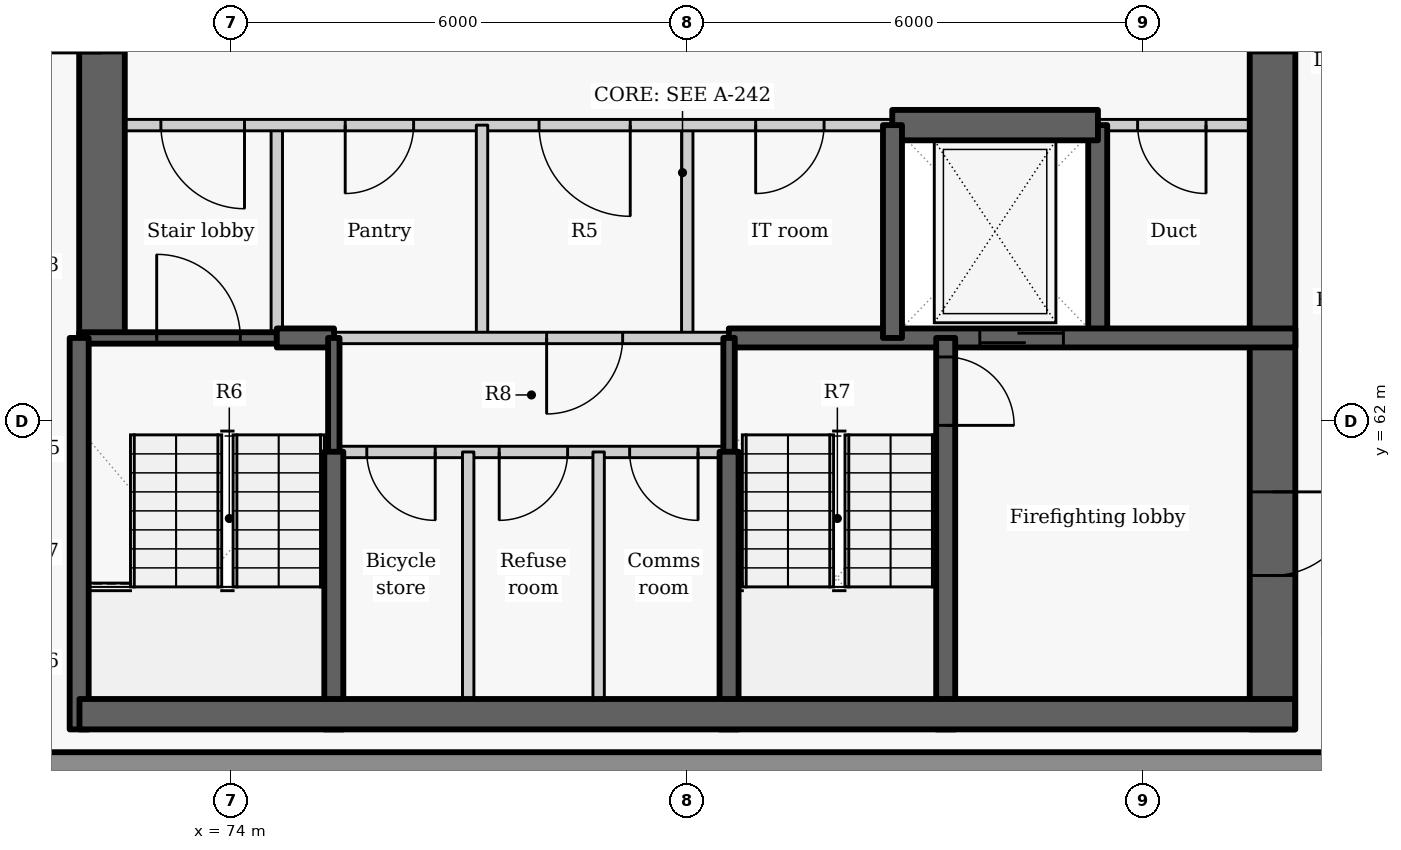
"""IFC4 building model, lengths in metres.
Left out: names, types, materials, properties, quantities, classifications, styles, units other than length and angle.
Written with IfcOpenShell. Run it as: python <this file> out.ifc"""

import sys

from ifc_helpers import new_model, si_unit, direction, frame, frame_2d, origin, place, context, subcontext, project, spatial, rectangle, extrude, element, fill, save


model = new_model("IFC4")
c1 = context("Model", 3, precision=1e-05, world=origin(), true_north=direction((0.0, 1.0)))
c2 = subcontext(c1, "Body", "Model", "MODEL_VIEW")
j1 = project(units=[si_unit("LENGTHUNIT", "METRE"), si_unit("PLANEANGLEUNIT", "RADIAN")], contexts=[c1])
p1 = place(None, origin())
s1 = spatial("IfcSite", under=j1, at=p1, CompositionType="ELEMENT")
p2 = place(p1, origin())
s2 = spatial("IfcBuilding", under=s1, at=p2, CompositionType="ELEMENT")
p3 = place(p2, frame((0.0, 0.0, 249.3)))
s3 = spatial("IfcBuildingStorey", under=s2, at=p3, CompositionType="ELEMENT", Elevation=249.3)
p4 = place(p3, frame((70.501, 57.5, 0.0), z_axis=(0.0, 0.0, 1.0), x_axis=(1.0, 0.0, 0.0)))
e1 = element("IfcWall", 1, at=p4, inside=s3, PredefinedType="SOLIDWALL", context=c2, shape_type="SweptSolid", body=[
    extrude(rectangle(XDim=18.993, YDim=0.3, at=frame_2d((9.496, 0.0))), origin(), (0.0, 0.0, 1.0), 2.425),
])
p5 = place(p3, frame((74.6, 63.1, 0.0), z_axis=(0.0, 0.0, 1.0), x_axis=(0.0, 1.0, 0.0)))
e2 = element("IfcWall", 2, at=p5, inside=s3, PredefinedType="PARTITIONING", context=c2, shape_type="SweptSolid", body=[
    extrude(rectangle(XDim=2.8, YDim=0.15, at=frame_2d((1.4, 0.0))), origin(), (0.0, 0.0, 1.0), 3.025),
])
p6 = place(p3, frame((72.3, 63.1, -0.275), z_axis=(0.0, 0.0, 1.0), x_axis=(0.0, 1.0, 0.0)))
e3 = element("IfcWall", 3, at=p6, inside=s3, PredefinedType="SHEAR", context=c2, shape_type="SweptSolid", body=[
    extrude(rectangle(XDim=9.1, YDim=0.6, at=frame_2d((4.55, 0.0))), origin(), (0.0, 0.0, 1.0), 3.3),
])
p7 = place(p6, frame((3.75, 0.0, 0.275)))
e4 = element("IfcOpeningElement", 4, at=p7, cuts=e3, PredefinedType="OPENING", context=c2, shape_type="SweptSolid", body=[
    extrude(rectangle(XDim=1.5, YDim=2.1, at=frame_2d((0.75, 1.05))), frame((0.0, 0.31, 0.0), z_axis=(0.0, -1.0, 0.0), x_axis=(1.0, 0.0, 0.0)), (0.0, 0.0, 1.0), 0.62),
])
p8 = place(p3, frame((85.4, 63.1, -0.275), z_axis=(0.0, 0.0, 1.0), x_axis=(0.0, 1.0, 0.0)))
e5 = element("IfcWall", 5, at=p8, inside=s3, PredefinedType="SHEAR", context=c2, shape_type="SweptSolid", body=[
    extrude(rectangle(XDim=2.8, YDim=0.25, at=frame_2d((1.4, 0.0))), origin(), (0.0, 0.0, 1.0), 3.3),
])
p9 = place(p3, frame((87.7, 72.2, -0.275), z_axis=(0.0, 0.0, 1.0), x_axis=(0.0, -1.0, 0.0)))
e6 = element("IfcWall", 6, at=p9, inside=s3, PredefinedType="SHEAR", context=c2, shape_type="SweptSolid", body=[
    extrude(rectangle(XDim=14.25, YDim=0.6, at=frame_2d((7.125, 0.0))), origin(), (0.0, 0.0, 1.0), 3.3),
])
p10 = place(p9, frame((3.85, 0.0, 0.275)))
e7 = element("IfcOpeningElement", 7, at=p10, cuts=e6, PredefinedType="OPENING", context=c2, shape_type="SweptSolid", body=[
    extrude(rectangle(XDim=1.5, YDim=2.1, at=frame_2d((0.75, 1.05))), frame((0.0, 0.31, 0.0), z_axis=(0.0, -1.0, 0.0), x_axis=(1.0, 0.0, 0.0)), (0.0, 0.0, 1.0), 0.62),
])
p11 = place(p9, frame((11.125, 0.0, 0.275)))
e8 = element("IfcOpeningElement", 8, at=p11, cuts=e6, PredefinedType="OPENING", context=c2, shape_type="SweptSolid", body=[
    extrude(rectangle(XDim=1.1, YDim=2.1, at=frame_2d((0.55, 1.05))), frame((0.0, 0.31, 0.0), z_axis=(0.0, -1.0, 0.0), x_axis=(1.0, 0.0, 0.0)), (0.0, 0.0, 1.0), 0.62),
])
p12 = place(p3, frame((80.0, 63.1, 0.0), z_axis=(0.0, 0.0, 1.0), x_axis=(0.0, 1.0, 0.0)))
e9 = element("IfcWall", 9, at=p12, inside=s3, PredefinedType="PARTITIONING", context=c2, shape_type="SweptSolid", body=[
    extrude(rectangle(XDim=2.8, YDim=0.15, at=frame_2d((1.4, 0.0))), origin(), (0.0, 0.0, 1.0), 3.025),
])
p13 = place(p3, frame((82.703, 65.9, 0.0), z_axis=(0.0, 0.0, 1.0), x_axis=(-1.0, 0.0, 0.0)))
e10 = element("IfcWall", 10, at=p13, inside=s3, PredefinedType="PARTITIONING", context=c2, shape_type="SweptSolid", body=[
    extrude(rectangle(XDim=10.703, YDim=0.15, at=frame_2d((5.352, 0.0))), origin(), (0.0, 0.0, 1.0), 3.025),
])
p14 = place(p13, frame((8.528, 0.0, 0.0)))
e11 = element("IfcOpeningElement", 11, at=p14, cuts=e10, PredefinedType="OPENING", context=c2, shape_type="SweptSolid", body=[
    extrude(rectangle(XDim=1.1, YDim=2.1, at=frame_2d((0.55, 1.05))), frame((0.0, 0.085, 0.0), z_axis=(0.0, -1.0, 0.0), x_axis=(1.0, 0.0, 0.0)), (0.0, 0.0, 1.0), 0.17),
])
p15 = place(p13, frame((6.303, 0.0, 0.0)))
e12 = element("IfcOpeningElement", 12, at=p15, cuts=e10, PredefinedType="OPENING", context=c2, shape_type="SweptSolid", body=[
    extrude(rectangle(XDim=0.9, YDim=2.1, at=frame_2d((0.45, 1.05))), frame((0.0, 0.085, 0.0), z_axis=(0.0, -1.0, 0.0), x_axis=(1.0, 0.0, 0.0)), (0.0, 0.0, 1.0), 0.17),
])
p16 = place(p13, frame((3.453, 0.0, 0.0)))
e13 = element("IfcOpeningElement", 13, at=p16, cuts=e10, PredefinedType="OPENING", context=c2, shape_type="SweptSolid", body=[
    extrude(rectangle(XDim=1.2, YDim=2.1, at=frame_2d((0.6, 1.05))), frame((0.0, 0.085, 0.0), z_axis=(0.0, -1.0, 0.0), x_axis=(1.0, 0.0, 0.0)), (0.0, 0.0, 1.0), 0.17),
])
p17 = place(p13, frame((0.903, 0.0, 0.0)))
e14 = element("IfcOpeningElement", 14, at=p17, cuts=e10, PredefinedType="OPENING", context=c2, shape_type="SweptSolid", body=[
    extrude(rectangle(XDim=0.9, YDim=2.1, at=frame_2d((0.45, 1.05))), frame((0.0, 0.085, 0.0), z_axis=(0.0, -1.0, 0.0), x_axis=(1.0, 0.0, 0.0)), (0.0, 0.0, 1.0), 0.17),
])
p18 = place(p3, frame((88.0, 65.9, 0.0), z_axis=(0.0, 0.0, 1.0), x_axis=(-1.0, 0.0, 0.0)))
e15 = element("IfcWall", 15, at=p18, inside=s3, PredefinedType="PARTITIONING", context=c2, shape_type="SweptSolid", body=[
    extrude(rectangle(XDim=2.603, YDim=0.15, at=frame_2d((1.302, 0.0))), origin(), (0.0, 0.0, 1.0), 3.025),
])
p19 = place(p18, frame((1.175, 0.0, 0.0)))
e16 = element("IfcOpeningElement", 16, at=p19, cuts=e15, PredefinedType="OPENING", context=c2, shape_type="SweptSolid", body=[
    extrude(rectangle(XDim=0.9, YDim=2.1, at=frame_2d((0.45, 1.05))), frame((0.0, 0.085, 0.0), z_axis=(0.0, -1.0, 0.0), x_axis=(1.0, 0.0, 0.0)), (0.0, 0.0, 1.0), 0.17),
])
p20 = place(p3, frame((82.697, 65.9, -0.275), z_axis=(0.0, 0.0, 1.0), x_axis=(1.0, 0.0, 0.0)))
e17 = element("IfcWall", 17, at=p20, inside=s3, PredefinedType="SHEAR", context=c2, shape_type="SweptSolid", body=[
    extrude(rectangle(XDim=2.706, YDim=0.4, at=frame_2d((1.353, 0.0))), origin(), (0.0, 0.0, 1.0), 3.3),
])
p21 = place(p3, frame((72.0, 63.1, -0.275), z_axis=(0.0, 0.0, 1.0), x_axis=(1.0, 0.0, 0.0)))
e18 = element("IfcWall", 18, at=p21, inside=s3, PredefinedType="SHEAR", context=c2, shape_type="SweptSolid", body=[
    extrude(rectangle(XDim=2.6, YDim=0.15, at=frame_2d((1.3, 0.0))), origin(), (0.0, 0.0, 1.0), 3.3),
])
p22 = place(p21, frame((1.02, 0.0, 0.275)))
e19 = element("IfcOpeningElement", 19, at=p22, cuts=e18, PredefinedType="OPENING", context=c2, shape_type="SweptSolid", body=[
    extrude(rectangle(XDim=1.1, YDim=2.1, at=frame_2d((0.55, 1.05))), frame((0.0, 0.085, 0.0), z_axis=(0.0, -1.0, 0.0), x_axis=(1.0, 0.0, 0.0)), (0.0, 0.0, 1.0), 0.17),
])
p23 = place(p3, frame((77.3, 63.1, 0.0), z_axis=(0.0, 0.0, 1.0), x_axis=(0.0, 1.0, 0.0)))
e20 = element("IfcWall", 20, at=p23, inside=s3, PredefinedType="PARTITIONING", context=c2, shape_type="SweptSolid", body=[
    extrude(rectangle(XDim=2.8, YDim=0.15, at=frame_2d((1.4, 0.0))), origin(), (0.0, 0.0, 1.0), 3.025),
])
p24 = place(p3, frame((74.6, 63.1, -0.275), z_axis=(0.0, 0.0, 1.0), x_axis=(1.0, 0.0, 0.0)))
e21 = element("IfcWall", 21, at=p24, inside=s3, PredefinedType="SHEAR", context=c2, shape_type="SweptSolid", body=[
    extrude(rectangle(XDim=0.753, YDim=0.25, at=frame_2d((0.376, 0.0))), origin(), (0.0, 0.0, 1.0), 3.3),
])
p25 = place(p3, frame((80.547, 63.1, -0.275), z_axis=(0.0, 0.0, 1.0), x_axis=(1.0, 0.0, 0.0)))
e22 = element("IfcWall", 22, at=p25, inside=s3, PredefinedType="SHEAR", context=c2, shape_type="SweptSolid", body=[
    extrude(rectangle(XDim=7.453, YDim=0.25, at=frame_2d((3.727, 0.0))), origin(), (0.0, 0.0, 1.0), 3.3),
])
p26 = place(p25, frame((3.302, 0.0, 0.275)))
e23 = element("IfcOpeningElement", 23, at=p26, cuts=e22, PredefinedType="OPENING", context=c2, shape_type="SweptSolid", body=[
    extrude(rectangle(XDim=1.1, YDim=2.1, at=frame_2d((0.55, 1.05))), frame((0.0, 0.135, 0.0), z_axis=(0.0, -1.0, 0.0), x_axis=(1.0, 0.0, 0.0)), (0.0, 0.0, 1.0), 0.27),
])
p27 = place(p3, frame((80.553, 63.1, 0.0), z_axis=(0.0, 0.0, 1.0), x_axis=(-1.0, 0.0, 0.0)))
e24 = element("IfcWall", 24, at=p27, inside=s3, PredefinedType="PARTITIONING", context=c2, shape_type="SweptSolid", body=[
    extrude(rectangle(XDim=5.206, YDim=0.15, at=frame_2d((2.603, 0.0))), origin(), (0.0, 0.0, 1.0), 3.025),
])
p28 = place(p27, frame((1.403, 0.0, 0.0)))
e25 = element("IfcOpeningElement", 25, at=p28, cuts=e24, PredefinedType="OPENING", context=c2, shape_type="SweptSolid", body=[
    extrude(rectangle(XDim=1.0, YDim=2.1, at=frame_2d((0.5, 1.05))), frame((0.0, 0.085, 0.0), z_axis=(0.0, -1.0, 0.0), x_axis=(1.0, 0.0, 0.0)), (0.0, 0.0, 1.0), 0.17),
])
p29 = place(p3, frame((82.7, 63.1, -0.275), z_axis=(0.0, 0.0, 1.0), x_axis=(0.0, 1.0, 0.0)))
e26 = element("IfcWall", 26, at=p29, inside=s3, PredefinedType="SHEAR", context=c2, shape_type="SweptSolid", body=[
    extrude(rectangle(XDim=2.8, YDim=0.25, at=frame_2d((1.4, 0.0))), origin(), (0.0, 0.0, 1.0), 3.3),
])
p30 = place(p3, frame((75.35, 61.597, -0.275), z_axis=(0.0, 0.0, 1.0), x_axis=(0.0, 1.0, 0.0)))
e27 = element("IfcWall", 27, at=p30, inside=s3, PredefinedType="SHEAR", context=c2, shape_type="SweptSolid", body=[
    extrude(rectangle(XDim=1.503, YDim=0.15, at=frame_2d((0.751, 0.0))), origin(), (0.0, 0.0, 1.0), 3.3),
])
p31 = place(p3, frame((75.35, 57.95, -0.275), z_axis=(0.0, 0.0, 1.0), x_axis=(0.0, 1.0, 0.0)))
e28 = element("IfcWall", 28, at=p31, inside=s3, PredefinedType="SHEAR", context=c2, shape_type="SweptSolid", body=[
    extrude(rectangle(XDim=3.653, YDim=0.25, at=frame_2d((1.827, 0.0))), origin(), (0.0, 0.0, 1.0), 3.3),
])
p32 = place(p3, frame((72.0, 57.95, -0.275), z_axis=(0.0, 0.0, 1.0), x_axis=(0.0, 1.0, 0.0)))
e29 = element("IfcWall", 29, at=p32, inside=s3, PredefinedType="SHEAR", context=c2, shape_type="SweptSolid", body=[
    extrude(rectangle(XDim=5.15, YDim=0.25, at=frame_2d((2.575, 0.0))), origin(), (0.0, 0.0, 1.0), 3.3),
])
p33 = place(p3, frame((83.4, 63.1, -0.275), z_axis=(0.0, 0.0, 1.0), x_axis=(0.0, -1.0, 0.0)))
e30 = element("IfcWall", 30, at=p33, inside=s3, PredefinedType="SHEAR", context=c2, shape_type="SweptSolid", body=[
    extrude(rectangle(XDim=5.15, YDim=0.25, at=frame_2d((2.575, 0.0))), origin(), (0.0, 0.0, 1.0), 3.3),
])
p34 = place(p33, frame((0.25, 0.0, 0.275)))
e31 = element("IfcOpeningElement", 31, at=p34, cuts=e30, PredefinedType="OPENING", context=c2, shape_type="SweptSolid", body=[
    extrude(rectangle(XDim=0.9, YDim=2.1, at=frame_2d((0.45, 1.05))), frame((0.0, 0.135, 0.0), z_axis=(0.0, -1.0, 0.0), x_axis=(1.0, 0.0, 0.0)), (0.0, 0.0, 1.0), 0.27),
])
p35 = place(p3, frame((80.55, 61.597, -0.275), z_axis=(0.0, 0.0, 1.0), x_axis=(0.0, 1.0, 0.0)))
e32 = element("IfcWall", 32, at=p35, inside=s3, PredefinedType="SHEAR", context=c2, shape_type="SweptSolid", body=[
    extrude(rectangle(XDim=1.503, YDim=0.15, at=frame_2d((0.751, 0.0))), origin(), (0.0, 0.0, 1.0), 3.3),
])
p36 = place(p3, frame((80.55, 57.95, -0.275), z_axis=(0.0, 0.0, 1.0), x_axis=(0.0, 1.0, 0.0)))
e33 = element("IfcWall", 33, at=p36, inside=s3, PredefinedType="SHEAR", context=c2, shape_type="SweptSolid", body=[
    extrude(rectangle(XDim=3.653, YDim=0.25, at=frame_2d((1.827, 0.0))), origin(), (0.0, 0.0, 1.0), 3.3),
])
p37 = place(p3, frame((80.55, 61.6, 0.0), z_axis=(0.0, 0.0, 1.0), x_axis=(-1.0, 0.0, 0.0)))
e34 = element("IfcWall", 34, at=p37, inside=s3, PredefinedType="PARTITIONING", context=c2, shape_type="SweptSolid", body=[
    extrude(rectangle(XDim=5.2, YDim=0.15, at=frame_2d((2.6, 0.0))), origin(), (0.0, 0.0, 1.0), 3.025),
])
p38 = place(p37, frame((3.866, 0.0, 0.0)))
e35 = element("IfcOpeningElement", 35, at=p38, cuts=e34, PredefinedType="OPENING", context=c2, shape_type="SweptSolid", body=[
    extrude(rectangle(XDim=0.9, YDim=2.1, at=frame_2d((0.45, 1.05))), frame((0.0, 0.085, 0.0), z_axis=(0.0, -1.0, 0.0), x_axis=(1.0, 0.0, 0.0)), (0.0, 0.0, 1.0), 0.17),
])
p39 = place(p37, frame((2.124, 0.0, 0.0)))
e36 = element("IfcOpeningElement", 36, at=p39, cuts=e34, PredefinedType="OPENING", context=c2, shape_type="SweptSolid", body=[
    extrude(rectangle(XDim=0.9, YDim=2.1, at=frame_2d((0.45, 1.05))), frame((0.0, 0.085, 0.0), z_axis=(0.0, -1.0, 0.0), x_axis=(1.0, 0.0, 0.0)), (0.0, 0.0, 1.0), 0.17),
])
p40 = place(p37, frame((0.408, 0.0, 0.0)))
e37 = element("IfcOpeningElement", 37, at=p40, cuts=e34, PredefinedType="OPENING", context=c2, shape_type="SweptSolid", body=[
    extrude(rectangle(XDim=0.9, YDim=2.1, at=frame_2d((0.45, 1.05))), frame((0.0, 0.085, 0.0), z_axis=(0.0, -1.0, 0.0), x_axis=(1.0, 0.0, 0.0)), (0.0, 0.0, 1.0), 0.17),
])
for number, where, z_axis, x_axis in (
    (38, (77.118, 57.95, 0.0), (0.0, 0.0, 1.0), (0.0, 1.0, 0.0)),
    (39, (78.834, 57.95, 0.0), (0.0, 0.0, 1.0), (0.0, 1.0, 0.0)),
):
    element("IfcWall", number, at=place(p3, frame(where, z_axis=z_axis, x_axis=x_axis)), inside=s3, PredefinedType="PARTITIONING", context=c2, shape_type="SweptSolid", body=[
        extrude(rectangle(XDim=3.65, YDim=0.15, at=frame_2d((1.825, 0.0))), origin(), (0.0, 0.0, 1.0), 3.025),
    ])
p41 = place(p3, frame((72.004, 58.15, -0.275), z_axis=(0.0, 0.0, 1.0), x_axis=(1.0, 0.0, 0.0)))
e40 = element("IfcWall", 40, at=p41, inside=s3, PredefinedType="SHEAR", context=c2, shape_type="SweptSolid", body=[
    extrude(rectangle(XDim=15.992, YDim=0.4, at=frame_2d((7.996, 0.0))), origin(), (0.0, 0.0, 1.0), 3.3),
])
p42 = place(p14, origin())
e41 = element("IfcDoor", 41, at=p42, inside=s3, OperationType="SINGLE_SWING_LEFT", PredefinedType="DOOR", context=c2, shape_type="SweptSolid", body=[
    extrude(rectangle(XDim=1.1, YDim=2.1, at=frame_2d((0.55, 1.05))), frame((0.0, 0.025, 0.0), z_axis=(0.0, -1.0, 0.0), x_axis=(1.0, 0.0, 0.0)), (0.0, 0.0, 1.0), 0.05),
])
fill(e11, e41)
p43 = place(p15, origin())
e42 = element("IfcDoor", 42, at=p43, inside=s3, OperationType="SINGLE_SWING_RIGHT", PredefinedType="DOOR", context=c2, shape_type="SweptSolid", body=[
    extrude(rectangle(XDim=0.9, YDim=2.1, at=frame_2d((0.45, 1.05))), frame((0.0, 0.025, 0.0), z_axis=(0.0, -1.0, 0.0), x_axis=(1.0, 0.0, 0.0)), (0.0, 0.0, 1.0), 0.05),
])
fill(e12, e42)
p44 = place(p16, origin())
e43 = element("IfcDoor", 43, at=p44, inside=s3, OperationType="DOUBLE_DOOR_SINGLE_SWING", PredefinedType="DOOR", context=c2, shape_type="SweptSolid", body=[
    extrude(rectangle(XDim=1.2, YDim=2.1, at=frame_2d((0.6, 1.05))), frame((0.0, 0.025, 0.0), z_axis=(0.0, -1.0, 0.0), x_axis=(1.0, 0.0, 0.0)), (0.0, 0.0, 1.0), 0.05),
])
fill(e13, e43)
p45 = place(p17, origin())
e44 = element("IfcDoor", 44, at=p45, inside=s3, OperationType="SINGLE_SWING_RIGHT", PredefinedType="DOOR", context=c2, shape_type="SweptSolid", body=[
    extrude(rectangle(XDim=0.9, YDim=2.1, at=frame_2d((0.45, 1.05))), frame((0.0, 0.025, 0.0), z_axis=(0.0, -1.0, 0.0), x_axis=(1.0, 0.0, 0.0)), (0.0, 0.0, 1.0), 0.05),
])
fill(e14, e44)
p46 = place(p26, origin())
e45 = element("IfcDoor", 45, at=p46, inside=s3, OperationType="SLIDING_TO_LEFT", PredefinedType="DOOR", context=c2, shape_type="SweptSolid", body=[
    extrude(rectangle(XDim=1.1, YDim=2.1, at=frame_2d((0.55, 1.05))), frame((0.0, 0.025, 0.0), z_axis=(0.0, -1.0, 0.0), x_axis=(1.0, 0.0, 0.0)), (0.0, 0.0, 1.0), 0.05),
])
fill(e23, e45)
p47 = place(p19, origin())
e46 = element("IfcDoor", 46, at=p47, inside=s3, OperationType="SINGLE_SWING_LEFT", PredefinedType="DOOR", context=c2, shape_type="SweptSolid", body=[
    extrude(rectangle(XDim=0.9, YDim=2.1, at=frame_2d((0.45, 1.05))), frame((0.0, 0.025, 0.0), z_axis=(0.0, -1.0, 0.0), x_axis=(1.0, 0.0, 0.0)), (0.0, 0.0, 1.0), 0.05),
])
fill(e16, e46)
p48 = place(p28, origin())
e47 = element("IfcDoor", 47, at=p48, inside=s3, OperationType="SINGLE_SWING_RIGHT", PredefinedType="DOOR", context=c2, shape_type="SweptSolid", body=[
    extrude(rectangle(XDim=1.0, YDim=2.1, at=frame_2d((0.5, 1.05))), frame((0.0, 0.025, 0.0), z_axis=(0.0, -1.0, 0.0), x_axis=(1.0, 0.0, 0.0)), (0.0, 0.0, 1.0), 0.05),
])
fill(e25, e47)
p49 = place(p38, origin())
e48 = element("IfcDoor", 48, at=p49, inside=s3, OperationType="SINGLE_SWING_LEFT", PredefinedType="DOOR", context=c2, shape_type="SweptSolid", body=[
    extrude(rectangle(XDim=0.9, YDim=2.1, at=frame_2d((0.45, 1.05))), frame((0.0, 0.025, 0.0), z_axis=(0.0, -1.0, 0.0), x_axis=(1.0, 0.0, 0.0)), (0.0, 0.0, 1.0), 0.05),
])
fill(e35, e48)
p50 = place(p39, origin())
e49 = element("IfcDoor", 49, at=p50, inside=s3, OperationType="SINGLE_SWING_RIGHT", PredefinedType="DOOR", context=c2, shape_type="SweptSolid", body=[
    extrude(rectangle(XDim=0.9, YDim=2.1, at=frame_2d((0.45, 1.05))), frame((0.0, 0.025, 0.0), z_axis=(0.0, -1.0, 0.0), x_axis=(1.0, 0.0, 0.0)), (0.0, 0.0, 1.0), 0.05),
])
fill(e36, e49)
p51 = place(p40, origin())
e50 = element("IfcDoor", 50, at=p51, inside=s3, OperationType="SINGLE_SWING_LEFT", PredefinedType="DOOR", context=c2, shape_type="SweptSolid", body=[
    extrude(rectangle(XDim=0.9, YDim=2.1, at=frame_2d((0.45, 1.05))), frame((0.0, 0.025, 0.0), z_axis=(0.0, -1.0, 0.0), x_axis=(1.0, 0.0, 0.0)), (0.0, 0.0, 1.0), 0.05),
])
fill(e37, e50)
p52 = place(p22, origin())
e51 = element("IfcDoor", 51, at=p52, inside=s3, OperationType="SINGLE_SWING_LEFT", PredefinedType="DOOR", context=c2, shape_type="SweptSolid", body=[
    extrude(rectangle(XDim=1.1, YDim=2.1, at=frame_2d((0.55, 1.05))), frame((0.0, 0.025, 0.0), z_axis=(0.0, -1.0, 0.0), x_axis=(1.0, 0.0, 0.0)), (0.0, 0.0, 1.0), 0.05),
])
fill(e19, e51)
p53 = place(p34, origin())
e52 = element("IfcDoor", 52, at=p53, inside=s3, OperationType="SINGLE_SWING_RIGHT", PredefinedType="DOOR", context=c2, shape_type="SweptSolid", body=[
    extrude(rectangle(XDim=0.9, YDim=2.1, at=frame_2d((0.45, 1.05))), frame((0.0, 0.025, 0.0), z_axis=(0.0, -1.0, 0.0), x_axis=(1.0, 0.0, 0.0)), (0.0, 0.0, 1.0), 0.05),
])
fill(e31, e52)
p54 = place(p10, origin())
e53 = element("IfcDoor", 53, at=p54, inside=s3, OperationType="DOUBLE_DOOR_SINGLE_SWING", PredefinedType="DOOR", context=c2, shape_type="SweptSolid", body=[
    extrude(rectangle(XDim=1.5, YDim=2.1, at=frame_2d((0.75, 1.05))), frame((0.0, 0.025, 0.0), z_axis=(0.0, -1.0, 0.0), x_axis=(1.0, 0.0, 0.0)), (0.0, 0.0, 1.0), 0.05),
])
fill(e7, e53)
p55 = place(p11, origin())
e54 = element("IfcDoor", 54, at=p55, inside=s3, OperationType="SINGLE_SWING_LEFT", PredefinedType="DOOR", context=c2, shape_type="SweptSolid", body=[
    extrude(rectangle(XDim=1.1, YDim=2.1, at=frame_2d((0.55, 1.05))), frame((0.0, 0.025, 0.0), z_axis=(0.0, -1.0, 0.0), x_axis=(1.0, 0.0, 0.0)), (0.0, 0.0, 1.0), 0.05),
])
fill(e8, e54)
save(model, sys.argv[1])
